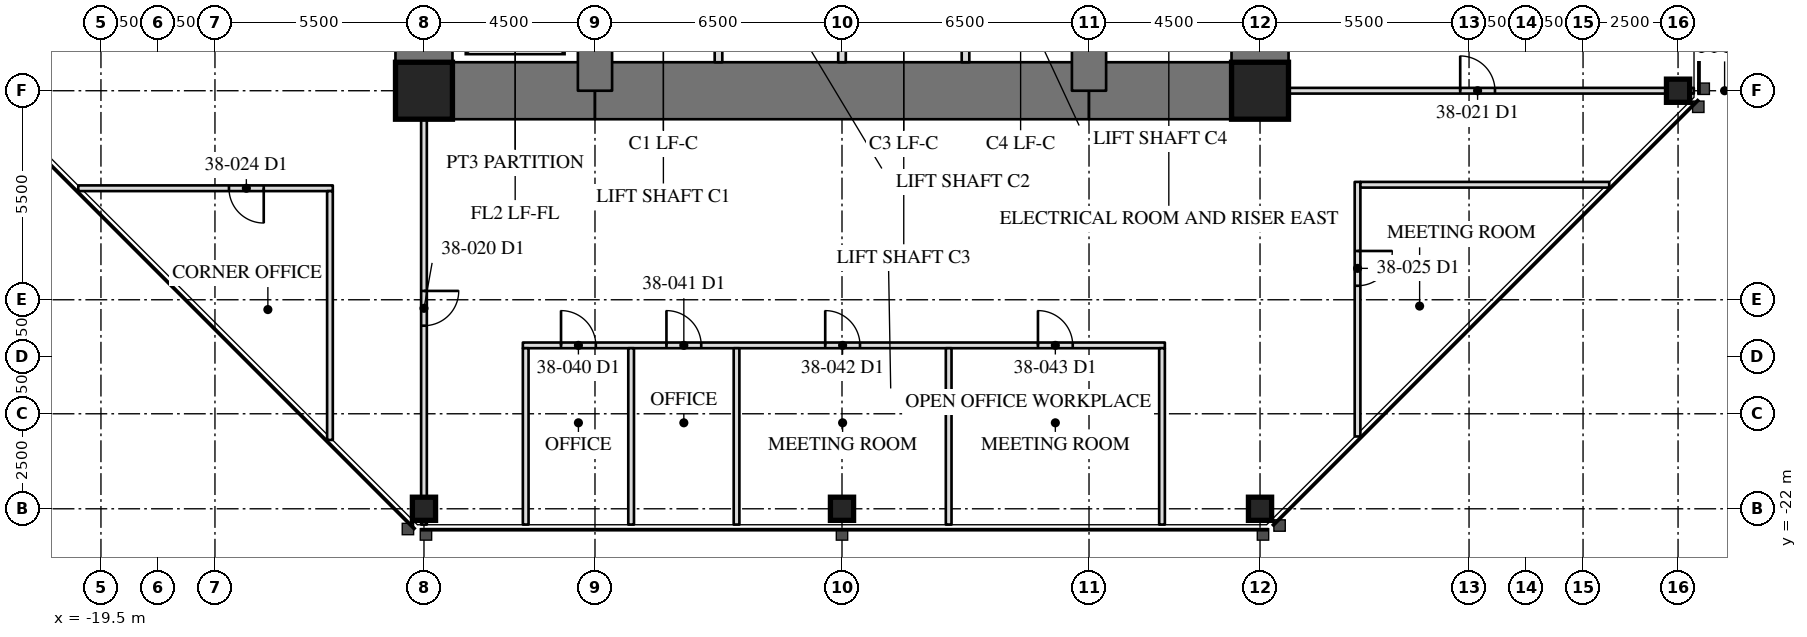
"""IFC4 building model, lengths in metres.
Left out: names, types, materials, properties, quantities, classifications, styles, units other than length and angle.
Written with IfcOpenShell. Run it as: python <this file> out.ifc"""

import sys

from ifc_helpers import new_model, si_unit, direction, frame, frame_2d, origin, origin_2d, place, context, subcontext, project, spatial, rectangle, hollow_rectangle, extrude, element, fill, save


model = new_model("IFC4")
c1 = context("Model", 3, precision=1e-05, world=origin(), true_north=direction((0.0, 1.0)))
c2 = subcontext(c1, "Body", "Model", "MODEL_VIEW")
j1 = project(units=[si_unit("LENGTHUNIT", "METRE"), si_unit("PLANEANGLEUNIT", "RADIAN")], contexts=[c1])
p1 = place(None, origin())
s1 = spatial("IfcSite", under=j1, at=p1, CompositionType="ELEMENT")
p2 = place(p1, origin())
s2 = spatial("IfcBuilding", under=s1, at=p2, CompositionType="ELEMENT")
p3 = place(p2, frame((0.0, 0.0, 162.3)))
s3 = spatial("IfcBuildingStorey", under=s2, at=p3, CompositionType="ELEMENT", Elevation=162.3)
for number, where, z_axis, x_axis in (
    (1, (-11.0, -22.0, 0.0), (0.0, 0.0, 1.0), (1.0, 0.0, 0.0)),
    (2, (0.0, -22.0, 0.0), (0.0, 0.0, 1.0), (1.0, 0.0, 0.0)),
    (3, (11.0, -22.0, 0.0), (0.0, 0.0, 1.0), (1.0, 0.0, 0.0)),
    (4, (22.0, -11.0, 0.0), (0.0, 0.0, 1.0), (0.0, 1.0, 0.0)),
):
    element("IfcColumn", number, at=place(p3, frame(where, z_axis=z_axis, x_axis=x_axis)), inside=s3, PredefinedType="COLUMN", context=c2, shape_type="SweptSolid", body=[
        extrude(hollow_rectangle(XDim=0.61, YDim=0.61, WallThickness=0.076, at=origin_2d()), origin(), (0.0, 0.0, 1.0), 4.1),
    ])
p4 = place(p3, frame((11.0, -11.0, 0.0), z_axis=(0.0, 0.0, 1.0), x_axis=(0.0, 1.0, 0.0)))
e5 = element("IfcWall", 5, at=p4, inside=s3, PredefinedType="SHEAR", context=c2, shape_type="SweptSolid", body=[
    extrude(rectangle(XDim=22.0, YDim=1.5, at=frame_2d((11.0, 0.0))), origin(), (0.0, 0.0, 1.0), 4.1),
])
p5 = place(p4, frame((15.393, 0.0, 0.0)))
e6 = element("IfcOpeningElement", 6, at=p5, cuts=e5, PredefinedType="OPENING", context=c2, shape_type="SweptSolid", body=[
    extrude(rectangle(XDim=0.915, YDim=2.134, at=frame_2d((0.458, 1.067))), frame((0.0, 0.76, 0.0), z_axis=(0.0, -1.0, 0.0), x_axis=(1.0, 0.0, 0.0)), (0.0, 0.0, 1.0), 1.52),
])
p6 = place(p3, frame((-11.0, 11.0, 0.0), z_axis=(0.0, 0.0, 1.0), x_axis=(0.0, -1.0, 0.0)))
e7 = element("IfcWall", 7, at=p6, inside=s3, PredefinedType="SHEAR", context=c2, shape_type="SweptSolid", body=[
    extrude(rectangle(XDim=22.0, YDim=1.5, at=frame_2d((11.0, 0.0))), origin(), (0.0, 0.0, 1.0), 4.1),
])
p7 = place(p6, frame((15.393, 0.0, 0.0)))
e8 = element("IfcOpeningElement", 8, at=p7, cuts=e7, PredefinedType="OPENING", context=c2, shape_type="SweptSolid", body=[
    extrude(rectangle(XDim=0.915, YDim=2.134, at=frame_2d((0.458, 1.067))), frame((0.0, 0.76, 0.0), z_axis=(0.0, -1.0, 0.0), x_axis=(1.0, 0.0, 0.0)), (0.0, 0.0, 1.0), 1.52),
])
p8 = place(p3, frame((-11.0, -11.0, 0.0), z_axis=(0.0, 0.0, 1.0), x_axis=(1.0, 0.0, 0.0)))
e9 = element("IfcWall", 9, at=p8, inside=s3, PredefinedType="SHEAR", context=c2, shape_type="SweptSolid", body=[
    extrude(rectangle(XDim=4.5, YDim=1.5, at=frame_2d((2.25, 0.0))), origin(), (0.0, 0.0, 1.0), 4.1),
])
p9 = place(p3, frame((-6.5, -11.0, 0.0), z_axis=(0.0, 0.0, 1.0), x_axis=(1.0, 0.0, 0.0)))
e10 = element("IfcWall", 10, at=p9, inside=s3, PredefinedType="SHEAR", context=c2, shape_type="SweptSolid", body=[
    extrude(rectangle(XDim=13.0, YDim=1.5, at=frame_2d((6.5, 0.0))), origin(), (0.0, 0.0, 1.0), 4.1),
])
p10 = place(p3, frame((6.5, -11.0, 0.0), z_axis=(0.0, 0.0, 1.0), x_axis=(1.0, 0.0, 0.0)))
e11 = element("IfcWall", 11, at=p10, inside=s3, PredefinedType="SHEAR", context=c2, shape_type="SweptSolid", body=[
    extrude(rectangle(XDim=4.5, YDim=1.5, at=frame_2d((2.25, 0.0))), origin(), (0.0, 0.0, 1.0), 4.1),
])
for number, where, z_axis, x_axis in (
    (12, (6.5, -11.0, 0.0), (0.0, 0.0, 1.0), (0.0, 1.0, 0.0)),
    (13, (-6.5, -6.5, 0.0), (0.0, 0.0, 1.0), (0.0, -1.0, 0.0)),
):
    element("IfcWall", number, at=place(p3, frame(where, z_axis=z_axis, x_axis=x_axis)), inside=s3, PredefinedType="SHEAR", context=c2, shape_type="SweptSolid", body=[
        extrude(rectangle(XDim=4.5, YDim=0.9, at=frame_2d((2.25, 0.0))), origin(), (0.0, 0.0, 1.0), 4.1),
    ])
for number, where, z_axis, x_axis in (
    (14, (-11.0, -11.0, 0.0), (0.0, 0.0, 1.0), (1.0, 0.0, 0.0)),
    (15, (11.0, -11.0, 0.0), (0.0, 0.0, 1.0), (1.0, 0.0, 0.0)),
):
    element("IfcColumn", number, at=place(p3, frame(where, z_axis=z_axis, x_axis=x_axis)), inside=s3, PredefinedType="COLUMN", context=c2, shape_type="SweptSolid", body=[
        extrude(hollow_rectangle(XDim=1.499, YDim=1.499, WallThickness=0.102, at=origin_2d()), origin(), (0.0, 0.0, 1.0), 4.1),
    ])
for number, where, z_axis, x_axis in (
    (16, (-3.25, -10.25, 0.0), (0.0, 0.0, 1.0), (0.0, 1.0, 0.0)),
    (17, (0.0, -10.25, 0.0), (0.0, 0.0, 1.0), (0.0, 1.0, 0.0)),
    (18, (3.25, -10.25, 0.0), (0.0, 0.0, 1.0), (0.0, 1.0, 0.0)),
):
    element("IfcWall", number, at=place(p3, frame(where, z_axis=z_axis, x_axis=x_axis)), inside=s3, PredefinedType="PARTITIONING", context=c2, shape_type="SweptSolid", body=[
        extrude(rectangle(XDim=3.3, YDim=0.2, at=frame_2d((1.65, 0.0))), origin(), (0.0, 0.0, 1.0), 3.91),
    ])
p11 = place(p3, frame((-11.0, -11.75, 0.0), z_axis=(0.0, 0.0, 1.0), x_axis=(0.0, -1.0, 0.0)))
e19 = element("IfcWall", 19, at=p11, inside=s3, PredefinedType="PARTITIONING", context=c2, shape_type="SweptSolid", body=[
    extrude(rectangle(XDim=10.665, YDim=0.15, at=frame_2d((5.333, 0.0))), origin(), (0.0, 0.0, 1.0), 3.326),
])
p12 = place(p11, frame((4.518, 0.0, 0.0)))
e20 = element("IfcOpeningElement", 20, at=p12, cuts=e19, PredefinedType="OPENING", context=c2, shape_type="SweptSolid", body=[
    extrude(rectangle(XDim=0.915, YDim=2.134, at=frame_2d((0.458, 1.067))), frame((0.0, 0.085, 0.0), z_axis=(0.0, -1.0, 0.0), x_axis=(1.0, 0.0, 0.0)), (0.0, 0.0, 1.0), 0.17),
])
p13 = place(p3, frame((11.75, -11.0, 0.0), z_axis=(0.0, 0.0, 1.0), x_axis=(1.0, 0.0, 0.0)))
e21 = element("IfcWall", 21, at=p13, inside=s3, PredefinedType="PARTITIONING", context=c2, shape_type="SweptSolid", body=[
    extrude(rectangle(XDim=10.665, YDim=0.15, at=frame_2d((5.333, 0.0))), origin(), (0.0, 0.0, 1.0), 3.326),
])
p14 = place(p13, frame((4.518, 0.0, 0.0)))
e22 = element("IfcOpeningElement", 22, at=p14, cuts=e21, PredefinedType="OPENING", context=c2, shape_type="SweptSolid", body=[
    extrude(rectangle(XDim=0.915, YDim=2.134, at=frame_2d((0.458, 1.067))), frame((0.0, 0.085, 0.0), z_axis=(0.0, -1.0, 0.0), x_axis=(1.0, 0.0, 0.0)), (0.0, 0.0, 1.0), 0.17),
])
p15 = place(p3, frame((-13.399, -13.566, 0.0), z_axis=(0.0, 0.0, 1.0), x_axis=(-1.0, 0.0, 0.0)))
e23 = element("IfcWall", 23, at=p15, inside=s3, PredefinedType="PARTITIONING", context=c2, shape_type="SweptSolid", body=[
    extrude(rectangle(XDim=6.698, YDim=0.15, at=frame_2d((3.349, 0.0))), origin(), (0.0, 0.0, 1.0), 3.91),
])
p16 = place(p15, frame((1.817, 0.0, 0.0)))
e24 = element("IfcOpeningElement", 24, at=p16, cuts=e23, PredefinedType="OPENING", context=c2, shape_type="SweptSolid", body=[
    extrude(rectangle(XDim=0.915, YDim=2.134, at=frame_2d((0.458, 1.067))), frame((0.0, 0.085, 0.0), z_axis=(0.0, -1.0, 0.0), x_axis=(1.0, 0.0, 0.0)), (0.0, 0.0, 1.0), 0.17),
])
p17 = place(p3, frame((-13.474, -13.641, 0.0), z_axis=(0.0, 0.0, 1.0), x_axis=(0.0, -1.0, 0.0)))
e25 = element("IfcWall", 25, at=p17, inside=s3, PredefinedType="PARTITIONING", context=c2, shape_type="SweptSolid", body=[
    extrude(rectangle(XDim=6.548, YDim=0.15, at=frame_2d((3.274, 0.0))), origin(), (0.0, 0.0, 1.0), 3.91),
])
p18 = place(p3, frame((13.566, -13.399, 0.0), z_axis=(0.0, 0.0, 1.0), x_axis=(0.0, -1.0, 0.0)))
e26 = element("IfcWall", 26, at=p18, inside=s3, PredefinedType="PARTITIONING", context=c2, shape_type="SweptSolid", body=[
    extrude(rectangle(XDim=6.698, YDim=0.15, at=frame_2d((3.349, 0.0))), origin(), (0.0, 0.0, 1.0), 3.91),
])
p19 = place(p18, frame((1.817, 0.0, 0.0)))
e27 = element("IfcOpeningElement", 27, at=p19, cuts=e26, PredefinedType="OPENING", context=c2, shape_type="SweptSolid", body=[
    extrude(rectangle(XDim=0.915, YDim=2.134, at=frame_2d((0.458, 1.067))), frame((0.0, 0.085, 0.0), z_axis=(0.0, -1.0, 0.0), x_axis=(1.0, 0.0, 0.0)), (0.0, 0.0, 1.0), 0.17),
])
p20 = place(p3, frame((13.641, -13.474, 0.0), z_axis=(0.0, 0.0, 1.0), x_axis=(1.0, 0.0, 0.0)))
e28 = element("IfcWall", 28, at=p20, inside=s3, PredefinedType="PARTITIONING", context=c2, shape_type="SweptSolid", body=[
    extrude(rectangle(XDim=6.548, YDim=0.15, at=frame_2d((3.274, 0.0))), origin(), (0.0, 0.0, 1.0), 3.91),
])
p21 = place(p3, frame((-8.398, -17.7, 0.0), z_axis=(0.0, 0.0, 1.0), x_axis=(1.0, 0.0, 0.0)))
e29 = element("IfcWall", 29, at=p21, inside=s3, PredefinedType="PARTITIONING", context=c2, shape_type="SweptSolid", body=[
    extrude(rectangle(XDim=16.894, YDim=0.15, at=frame_2d((8.447, 0.0))), origin(), (0.0, 0.0, 1.0), 3.91),
])
p22 = place(p21, frame((1.004, 0.0, 0.0)))
e30 = element("IfcOpeningElement", 30, at=p22, cuts=e29, PredefinedType="OPENING", context=c2, shape_type="SweptSolid", body=[
    extrude(rectangle(XDim=0.915, YDim=2.134, at=frame_2d((0.458, 1.067))), frame((0.0, 0.085, 0.0), z_axis=(0.0, -1.0, 0.0), x_axis=(1.0, 0.0, 0.0)), (0.0, 0.0, 1.0), 0.17),
])
p23 = place(p21, frame((3.779, 0.0, 0.0)))
e31 = element("IfcOpeningElement", 31, at=p23, cuts=e29, PredefinedType="OPENING", context=c2, shape_type="SweptSolid", body=[
    extrude(rectangle(XDim=0.915, YDim=2.134, at=frame_2d((0.458, 1.067))), frame((0.0, 0.085, 0.0), z_axis=(0.0, -1.0, 0.0), x_axis=(1.0, 0.0, 0.0)), (0.0, 0.0, 1.0), 0.17),
])
p24 = place(p21, frame((7.957, 0.0, 0.0)))
e32 = element("IfcOpeningElement", 32, at=p24, cuts=e29, PredefinedType="OPENING", context=c2, shape_type="SweptSolid", body=[
    extrude(rectangle(XDim=0.915, YDim=2.134, at=frame_2d((0.458, 1.067))), frame((0.0, 0.085, 0.0), z_axis=(0.0, -1.0, 0.0), x_axis=(1.0, 0.0, 0.0)), (0.0, 0.0, 1.0), 0.17),
])
p25 = place(p21, frame((13.554, 0.0, 0.0)))
e33 = element("IfcOpeningElement", 33, at=p25, cuts=e29, PredefinedType="OPENING", context=c2, shape_type="SweptSolid", body=[
    extrude(rectangle(XDim=0.915, YDim=2.134, at=frame_2d((0.458, 1.067))), frame((0.0, 0.085, 0.0), z_axis=(0.0, -1.0, 0.0), x_axis=(1.0, 0.0, 0.0)), (0.0, 0.0, 1.0), 0.17),
])
for number, where, z_axis, x_axis in (
    (34, (-8.323, -17.775, 0.0), (0.0, 0.0, 1.0), (0.0, -1.0, 0.0)),
    (35, (-5.549, -17.775, 0.0), (0.0, 0.0, 1.0), (0.0, -1.0, 0.0)),
    (36, (-2.775, -17.775, 0.0), (0.0, 0.0, 1.0), (0.0, -1.0, 0.0)),
    (37, (2.807, -17.775, 0.0), (0.0, 0.0, 1.0), (0.0, -1.0, 0.0)),
    (38, (8.421, -17.775, 0.0), (0.0, 0.0, 1.0), (0.0, -1.0, 0.0)),
):
    element("IfcWall", number, at=place(p3, frame(where, z_axis=z_axis, x_axis=x_axis)), inside=s3, PredefinedType="PARTITIONING", context=c2, shape_type="SweptSolid", body=[
        extrude(rectangle(XDim=4.64, YDim=0.15, at=frame_2d((2.32, 0.0))), origin(), (0.0, 0.0, 1.0), 3.91),
    ])
p26 = place(p12, origin())
e39 = element("IfcDoor", 39, at=p26, inside=s3, OperationType="SINGLE_SWING_LEFT", PredefinedType="DOOR", context=c2, shape_type="SweptSolid", body=[
    extrude(rectangle(XDim=0.915, YDim=2.134, at=frame_2d((0.458, 1.067))), frame((0.0, 0.025, 0.0), z_axis=(0.0, -1.0, 0.0), x_axis=(1.0, 0.0, 0.0)), (0.0, 0.0, 1.0), 0.05),
])
fill(e20, e39)
p27 = place(p14, origin())
e40 = element("IfcDoor", 40, at=p27, inside=s3, OperationType="SINGLE_SWING_LEFT", PredefinedType="DOOR", context=c2, shape_type="SweptSolid", body=[
    extrude(rectangle(XDim=0.915, YDim=2.134, at=frame_2d((0.458, 1.067))), frame((0.0, 0.025, 0.0), z_axis=(0.0, -1.0, 0.0), x_axis=(1.0, 0.0, 0.0)), (0.0, 0.0, 1.0), 0.05),
])
fill(e22, e40)
p28 = place(p16, origin())
e41 = element("IfcDoor", 41, at=p28, inside=s3, OperationType="SINGLE_SWING_LEFT", PredefinedType="DOOR", context=c2, shape_type="SweptSolid", body=[
    extrude(rectangle(XDim=0.915, YDim=2.134, at=frame_2d((0.458, 1.067))), frame((0.0, 0.025, 0.0), z_axis=(0.0, -1.0, 0.0), x_axis=(1.0, 0.0, 0.0)), (0.0, 0.0, 1.0), 0.05),
])
fill(e24, e41)
p29 = place(p19, origin())
e42 = element("IfcDoor", 42, at=p29, inside=s3, OperationType="SINGLE_SWING_LEFT", PredefinedType="DOOR", context=c2, shape_type="SweptSolid", body=[
    extrude(rectangle(XDim=0.915, YDim=2.134, at=frame_2d((0.458, 1.067))), frame((0.0, 0.025, 0.0), z_axis=(0.0, -1.0, 0.0), x_axis=(1.0, 0.0, 0.0)), (0.0, 0.0, 1.0), 0.05),
])
fill(e27, e42)
p30 = place(p22, origin())
e43 = element("IfcDoor", 43, at=p30, inside=s3, OperationType="SINGLE_SWING_LEFT", PredefinedType="DOOR", context=c2, shape_type="SweptSolid", body=[
    extrude(rectangle(XDim=0.915, YDim=2.134, at=frame_2d((0.458, 1.067))), frame((0.0, 0.025, 0.0), z_axis=(0.0, -1.0, 0.0), x_axis=(1.0, 0.0, 0.0)), (0.0, 0.0, 1.0), 0.05),
])
fill(e30, e43)
p31 = place(p23, origin())
e44 = element("IfcDoor", 44, at=p31, inside=s3, OperationType="SINGLE_SWING_LEFT", PredefinedType="DOOR", context=c2, shape_type="SweptSolid", body=[
    extrude(rectangle(XDim=0.915, YDim=2.134, at=frame_2d((0.458, 1.067))), frame((0.0, 0.025, 0.0), z_axis=(0.0, -1.0, 0.0), x_axis=(1.0, 0.0, 0.0)), (0.0, 0.0, 1.0), 0.05),
])
fill(e31, e44)
p32 = place(p24, origin())
e45 = element("IfcDoor", 45, at=p32, inside=s3, OperationType="SINGLE_SWING_LEFT", PredefinedType="DOOR", context=c2, shape_type="SweptSolid", body=[
    extrude(rectangle(XDim=0.915, YDim=2.134, at=frame_2d((0.458, 1.067))), frame((0.0, 0.025, 0.0), z_axis=(0.0, -1.0, 0.0), x_axis=(1.0, 0.0, 0.0)), (0.0, 0.0, 1.0), 0.05),
])
fill(e32, e45)
p33 = place(p25, origin())
e46 = element("IfcDoor", 46, at=p33, inside=s3, OperationType="SINGLE_SWING_LEFT", PredefinedType="DOOR", context=c2, shape_type="SweptSolid", body=[
    extrude(rectangle(XDim=0.915, YDim=2.134, at=frame_2d((0.458, 1.067))), frame((0.0, 0.025, 0.0), z_axis=(0.0, -1.0, 0.0), x_axis=(1.0, 0.0, 0.0)), (0.0, 0.0, 1.0), 0.05),
])
fill(e33, e46)
save(model, sys.argv[1])
